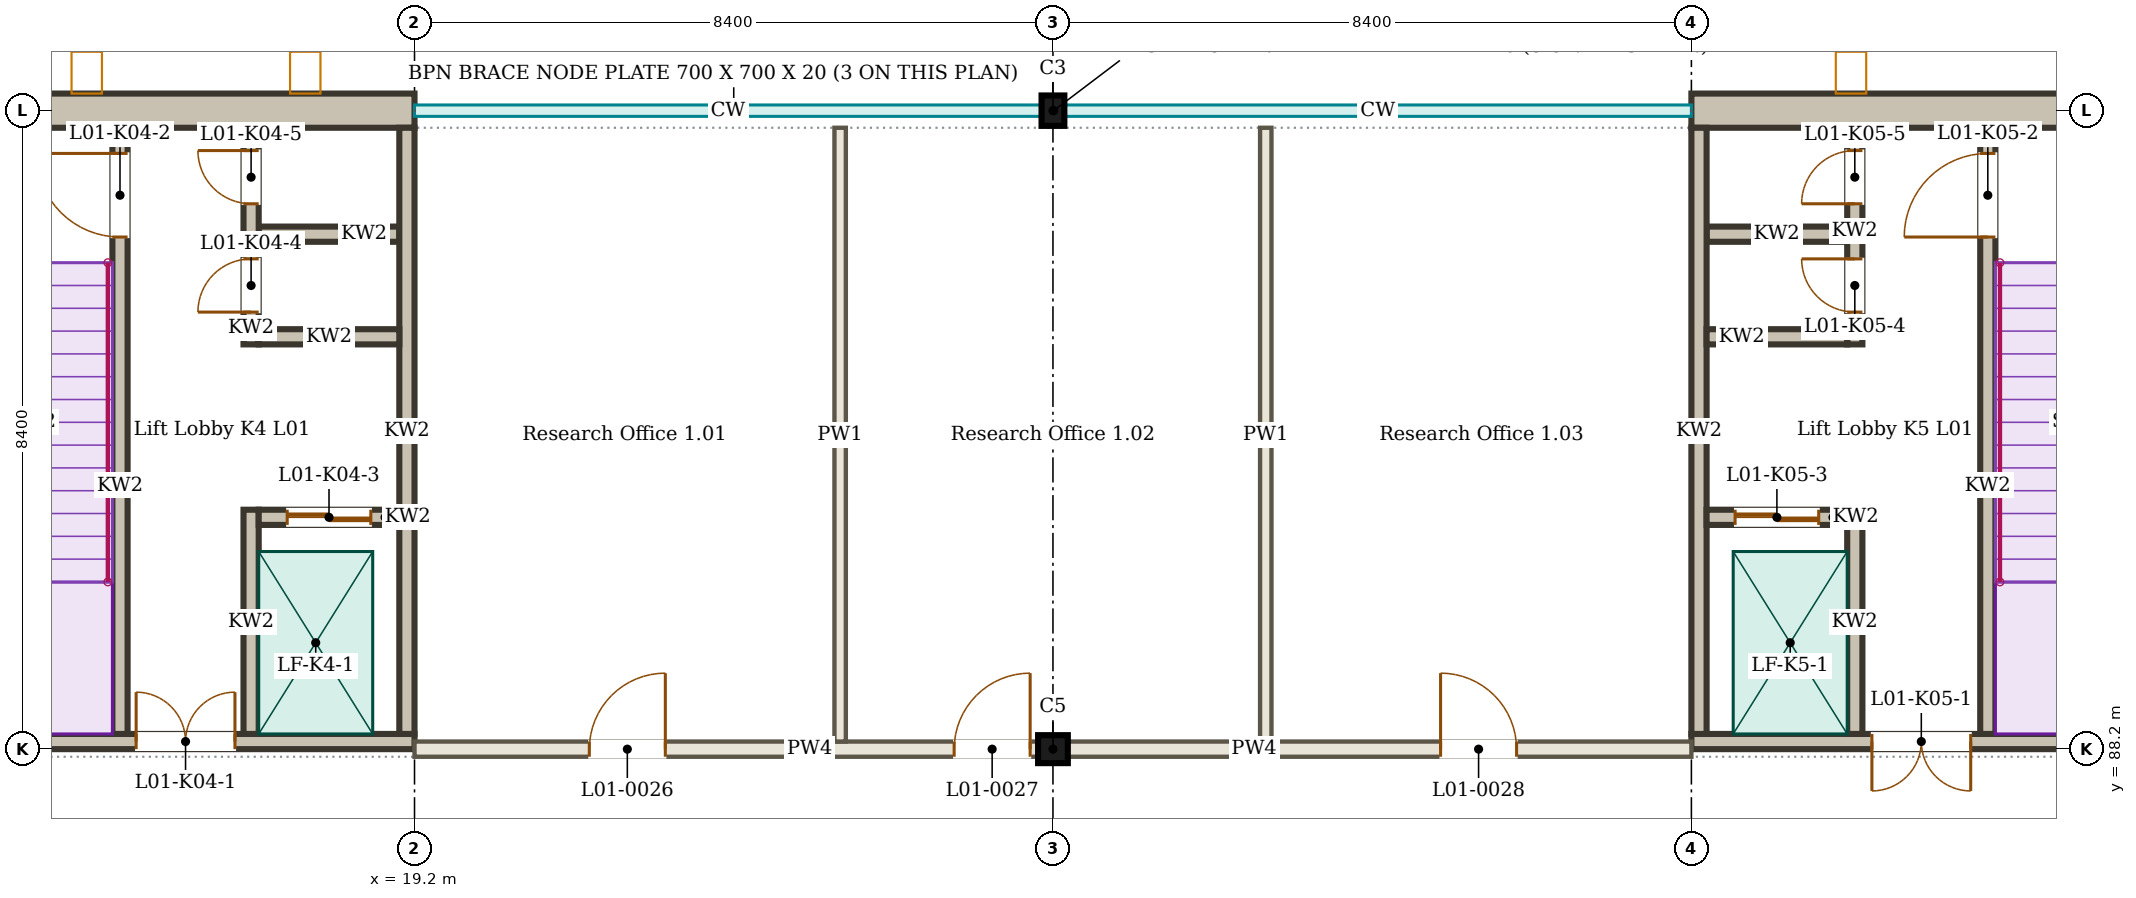
"""IFC4 building model, lengths in metres.
Left out: names, types, materials, properties, quantities, classifications, styles, units other than length and angle.
Written with IfcOpenShell. Run it as: python <this file> out.ifc"""

import sys

from ifc_helpers import new_model, si_unit, direction, frame, frame_2d, origin, origin_2d, place, context, subcontext, project, spatial, rectangle, i_section, extrude, element, fill, save


model = new_model("IFC4")
c1 = context("Model", 3, precision=1e-05, world=origin(), true_north=direction((0.0, 1.0)))
c2 = subcontext(c1, "Body", "Model", "MODEL_VIEW")
j1 = project(units=[si_unit("LENGTHUNIT", "METRE"), si_unit("PLANEANGLEUNIT", "RADIAN")], contexts=[c1])
p1 = place(None, origin())
s1 = spatial("IfcSite", under=j1, at=p1, CompositionType="ELEMENT")
p2 = place(p1, origin())
s2 = spatial("IfcBuilding", under=s1, at=p2, CompositionType="ELEMENT")
p3 = place(p2, frame((0.0, 0.0, 4.5)))
s3 = spatial("IfcBuildingStorey", under=s2, at=p3, CompositionType="ELEMENT", Elevation=4.5)
p4 = place(p3, frame((27.6, 88.2, 0.0), z_axis=(0.0, 0.0, 1.0), x_axis=(1.0, 0.0, 0.0)))
e1 = element("IfcColumn", 1, at=p4, inside=s3, PredefinedType="COLUMN", context=c2, shape_type="SweptSolid", body=[
    extrude(i_section(OverallWidth=0.391, OverallDepth=0.368, WebThickness=0.015, FlangeThickness=0.024, FilletRadius=0.027, at=origin_2d()), origin(), (0.0, 0.0, 1.0), 4.5),
])
p5 = place(p3, frame((27.6, 96.6, 0.0), z_axis=(0.0, 0.0, 1.0), x_axis=(1.0, 0.0, 0.0)))
e2 = element("IfcColumn", 2, at=p5, inside=s3, PredefinedType="COLUMN", context=c2, shape_type="SweptSolid", body=[
    extrude(i_section(OverallWidth=0.3, OverallDepth=0.4, WebThickness=0.013, FlangeThickness=0.024, FilletRadius=0.027, at=origin_2d()), origin(), (0.0, 0.0, 1.0), 4.5),
])
p6 = place(p3, frame((19.2, 88.2, 0.0), z_axis=(0.0, 0.0, 1.0), x_axis=(1.0, 0.0, 0.0)))
e3 = element("IfcWall", 3, at=p6, inside=s3, PredefinedType="PARTITIONING", context=c2, shape_type="SweptSolid", body=[
    extrude(rectangle(XDim=8.205, YDim=0.2, at=frame_2d((4.102, 0.0))), origin(), (0.0, 0.0, 1.0), 3.8),
])
p7 = place(p6, frame((2.3, 0.0, 0.0)))
e4 = element("IfcOpeningElement", 4, at=p7, cuts=e3, PredefinedType="OPENING", context=c2, shape_type="SweptSolid", body=[
    extrude(rectangle(XDim=1.0, YDim=2.1, at=frame_2d((0.5, 1.05))), frame((0.0, 0.11, 0.0), z_axis=(0.0, -1.0, 0.0), x_axis=(1.0, 0.0, 0.0)), (0.0, 0.0, 1.0), 0.22),
])
p8 = place(p6, frame((7.1, 0.0, 0.0)))
e5 = element("IfcOpeningElement", 5, at=p8, cuts=e3, PredefinedType="OPENING", context=c2, shape_type="SweptSolid", body=[
    extrude(rectangle(XDim=1.0, YDim=2.1, at=frame_2d((0.5, 1.05))), frame((0.0, 0.11, 0.0), z_axis=(0.0, -1.0, 0.0), x_axis=(1.0, 0.0, 0.0)), (0.0, 0.0, 1.0), 0.22),
])
p9 = place(p3, frame((27.795, 88.2, 0.0), z_axis=(0.0, 0.0, 1.0), x_axis=(1.0, 0.0, 0.0)))
e6 = element("IfcWall", 6, at=p9, inside=s3, PredefinedType="PARTITIONING", context=c2, shape_type="SweptSolid", body=[
    extrude(rectangle(XDim=8.205, YDim=0.2, at=frame_2d((4.102, 0.0))), origin(), (0.0, 0.0, 1.0), 3.8),
])
p10 = place(p9, frame((4.905, 0.0, 0.0)))
e7 = element("IfcOpeningElement", 7, at=p10, cuts=e6, PredefinedType="OPENING", context=c2, shape_type="SweptSolid", body=[
    extrude(rectangle(XDim=1.0, YDim=2.1, at=frame_2d((0.5, 1.05))), frame((0.0, 0.11, 0.0), z_axis=(0.0, -1.0, 0.0), x_axis=(1.0, 0.0, 0.0)), (0.0, 0.0, 1.0), 0.22),
])
for number, where, z_axis, x_axis in (
    (8, (24.8, 88.3, 0.0), (0.0, 0.0, 1.0), (0.0, 1.0, 0.0)),
    (9, (30.4, 88.3, 0.0), (0.0, 0.0, 1.0), (0.0, 1.0, 0.0)),
):
    element("IfcWall", number, at=place(p3, frame(where, z_axis=z_axis, x_axis=x_axis)), inside=s3, PredefinedType="PARTITIONING", context=c2, shape_type="SweptSolid", body=[
        extrude(rectangle(XDim=8.075, YDim=0.15, at=frame_2d((4.038, 0.0))), origin(), (0.0, 0.0, 1.0), 3.8),
    ])
p11 = place(p3, frame((11.025, 88.3, 0.0), z_axis=(0.0, 0.0, 1.0), x_axis=(1.0, 0.0, 0.0)))
e10 = element("IfcWall", 10, at=p11, inside=s3, PredefinedType="SOLIDWALL", context=c2, shape_type="SweptSolid", body=[
    extrude(rectangle(XDim=8.175, YDim=0.2, at=frame_2d((4.087, 0.0))), origin(), (0.0, 0.0, 1.0), 4.5),
])
p12 = place(p11, frame((4.512, 0.0, 0.0)))
e11 = element("IfcOpeningElement", 11, at=p12, cuts=e10, PredefinedType="OPENING", context=c2, shape_type="SweptSolid", body=[
    extrude(rectangle(XDim=1.3, YDim=2.1, at=frame_2d((0.65, 1.05))), frame((0.0, 0.11, 0.0), z_axis=(0.0, -1.0, 0.0), x_axis=(1.0, 0.0, 0.0)), (0.0, 0.0, 1.0), 0.22),
])
p13 = place(p3, frame((10.575, 96.6, 0.0), z_axis=(0.0, 0.0, 1.0), x_axis=(1.0, 0.0, 0.0)))
e12 = element("IfcWall", 12, at=p13, inside=s3, PredefinedType="SOLIDWALL", context=c2, shape_type="SweptSolid", body=[
    extrude(rectangle(XDim=8.625, YDim=0.45, at=frame_2d((4.312, 0.0))), origin(), (0.0, 0.0, 1.0), 4.5),
])
p14 = place(p3, frame((19.1, 88.4, 0.0), z_axis=(0.0, 0.0, 1.0), x_axis=(0.0, 1.0, 0.0)))
e13 = element("IfcWall", 13, at=p14, inside=s3, PredefinedType="SOLIDWALL", context=c2, shape_type="SweptSolid", body=[
    extrude(rectangle(XDim=7.975, YDim=0.2, at=frame_2d((3.988, 0.0))), origin(), (0.0, 0.0, 1.0), 4.5),
])
p15 = place(p3, frame((15.325, 88.4, 0.0), z_axis=(0.0, 0.0, 1.0), x_axis=(0.0, 1.0, 0.0)))
e14 = element("IfcWall", 14, at=p15, inside=s3, PredefinedType="SOLIDWALL", context=c2, shape_type="SweptSolid", body=[
    extrude(rectangle(XDim=7.975, YDim=0.2, at=frame_2d((3.988, 0.0))), origin(), (0.0, 0.0, 1.0), 4.5),
])
p16 = place(p15, frame((6.538, 0.0, 0.0)))
e15 = element("IfcOpeningElement", 15, at=p16, cuts=e14, PredefinedType="OPENING", context=c2, shape_type="SweptSolid", body=[
    extrude(rectangle(XDim=1.1, YDim=2.1, at=frame_2d((0.55, 1.05))), frame((0.0, 0.11, 0.0), z_axis=(0.0, -1.0, 0.0), x_axis=(1.0, 0.0, 0.0)), (0.0, 0.0, 1.0), 0.22),
])
p17 = place(p3, frame((17.05, 88.4, 0.0), z_axis=(0.0, 0.0, 1.0), x_axis=(0.0, 1.0, 0.0)))
e16 = element("IfcWall", 16, at=p17, inside=s3, PredefinedType="SOLIDWALL", context=c2, shape_type="SweptSolid", body=[
    extrude(rectangle(XDim=2.95, YDim=0.2, at=frame_2d((1.475, 0.0))), origin(), (0.0, 0.0, 1.0), 4.5),
])
p18 = place(p3, frame((17.05, 93.525, 0.0), z_axis=(0.0, 0.0, 1.0), x_axis=(0.0, 1.0, 0.0)))
e17 = element("IfcWall", 17, at=p18, inside=s3, PredefinedType="SOLIDWALL", context=c2, shape_type="SweptSolid", body=[
    extrude(rectangle(XDim=2.85, YDim=0.2, at=frame_2d((1.425, 0.0))), origin(), (0.0, 0.0, 1.0), 4.35),
])
p19 = place(p18, frame((0.425, 0.0, 0.0)))
e18 = element("IfcOpeningElement", 18, at=p19, cuts=e17, PredefinedType="OPENING", context=c2, shape_type="SweptSolid", body=[
    extrude(rectangle(XDim=0.7, YDim=2.1, at=frame_2d((0.35, 1.05))), frame((0.0, 0.11, 0.0), z_axis=(0.0, -1.0, 0.0), x_axis=(1.0, 0.0, 0.0)), (0.0, 0.0, 1.0), 0.22),
])
p20 = place(p18, frame((1.85, 0.0, 0.0)))
e19 = element("IfcOpeningElement", 19, at=p20, cuts=e17, PredefinedType="OPENING", context=c2, shape_type="SweptSolid", body=[
    extrude(rectangle(XDim=0.7, YDim=2.1, at=frame_2d((0.35, 1.05))), frame((0.0, 0.11, 0.0), z_axis=(0.0, -1.0, 0.0), x_axis=(1.0, 0.0, 0.0)), (0.0, 0.0, 1.0), 0.22),
])
p21 = place(p3, frame((17.15, 91.25, 0.0), z_axis=(0.0, 0.0, 1.0), x_axis=(1.0, 0.0, 0.0)))
e20 = element("IfcWall", 20, at=p21, inside=s3, PredefinedType="SOLIDWALL", context=c2, shape_type="SweptSolid", body=[
    extrude(rectangle(XDim=1.85, YDim=0.2, at=frame_2d((0.925, 0.0))), origin(), (0.0, 0.0, 1.0), 4.5),
])
p22 = place(p21, frame((0.375, 0.0, 0.0)))
e21 = element("IfcOpeningElement", 21, at=p22, cuts=e20, PredefinedType="OPENING", context=c2, shape_type="SweptSolid", body=[
    extrude(rectangle(XDim=1.1, YDim=2.1, at=frame_2d((0.55, 1.05))), frame((0.0, 0.11, 0.0), z_axis=(0.0, -1.0, 0.0), x_axis=(1.0, 0.0, 0.0)), (0.0, 0.0, 1.0), 0.22),
])
for number, where, z_axis, x_axis in (
    (22, (17.15, 93.625, 0.0), (0.0, 0.0, 1.0), (1.0, 0.0, 0.0)),
    (23, (17.15, 94.975, 0.0), (0.0, 0.0, 1.0), (1.0, 0.0, 0.0)),
):
    element("IfcWall", number, at=place(p3, frame(where, z_axis=z_axis, x_axis=x_axis)), inside=s3, PredefinedType="SOLIDWALL", context=c2, shape_type="SweptSolid", body=[
        extrude(rectangle(XDim=1.85, YDim=0.2, at=frame_2d((0.925, 0.0))), origin(), (0.0, 0.0, 1.0), 4.35),
    ])
p23 = place(p3, frame((44.4, 88.3, 0.0), z_axis=(0.0, 0.0, 1.0), x_axis=(-1.0, 0.0, 0.0)))
e24 = element("IfcWall", 24, at=p23, inside=s3, PredefinedType="SOLIDWALL", context=c2, shape_type="SweptSolid", body=[
    extrude(rectangle(XDim=8.4, YDim=0.2, at=frame_2d((4.2, 0.0))), origin(), (0.0, 0.0, 1.0), 4.5),
])
p24 = place(p23, frame((4.725, 0.0, 0.0)))
e25 = element("IfcOpeningElement", 25, at=p24, cuts=e24, PredefinedType="OPENING", context=c2, shape_type="SweptSolid", body=[
    extrude(rectangle(XDim=1.3, YDim=2.1, at=frame_2d((0.65, 1.05))), frame((0.0, 0.11, 0.0), z_axis=(0.0, -1.0, 0.0), x_axis=(1.0, 0.0, 0.0)), (0.0, 0.0, 1.0), 0.22),
])
p25 = place(p3, frame((44.4, 96.6, 0.0), z_axis=(0.0, 0.0, 1.0), x_axis=(-1.0, 0.0, 0.0)))
e26 = element("IfcWall", 26, at=p25, inside=s3, PredefinedType="SOLIDWALL", context=c2, shape_type="SweptSolid", body=[
    extrude(rectangle(XDim=8.4, YDim=0.45, at=frame_2d((4.2, 0.0))), origin(), (0.0, 0.0, 1.0), 4.5),
])
p26 = place(p3, frame((36.1, 88.4, 0.0), z_axis=(0.0, 0.0, 1.0), x_axis=(0.0, 1.0, 0.0)))
e27 = element("IfcWall", 27, at=p26, inside=s3, PredefinedType="SOLIDWALL", context=c2, shape_type="SweptSolid", body=[
    extrude(rectangle(XDim=7.975, YDim=0.2, at=frame_2d((3.988, 0.0))), origin(), (0.0, 0.0, 1.0), 4.5),
])
p27 = place(p3, frame((39.9, 88.4, 0.0), z_axis=(0.0, 0.0, 1.0), x_axis=(0.0, 1.0, 0.0)))
e28 = element("IfcWall", 28, at=p27, inside=s3, PredefinedType="SOLIDWALL", context=c2, shape_type="SweptSolid", body=[
    extrude(rectangle(XDim=7.975, YDim=0.2, at=frame_2d((3.988, 0.0))), origin(), (0.0, 0.0, 1.0), 4.5),
])
p28 = place(p27, frame((6.538, 0.0, 0.0)))
e29 = element("IfcOpeningElement", 29, at=p28, cuts=e28, PredefinedType="OPENING", context=c2, shape_type="SweptSolid", body=[
    extrude(rectangle(XDim=1.1, YDim=2.1, at=frame_2d((0.55, 1.05))), frame((0.0, 0.11, 0.0), z_axis=(0.0, -1.0, 0.0), x_axis=(1.0, 0.0, 0.0)), (0.0, 0.0, 1.0), 0.22),
])
p29 = place(p3, frame((38.15, 88.4, 0.0), z_axis=(0.0, 0.0, 1.0), x_axis=(0.0, 1.0, 0.0)))
e30 = element("IfcWall", 30, at=p29, inside=s3, PredefinedType="SOLIDWALL", context=c2, shape_type="SweptSolid", body=[
    extrude(rectangle(XDim=2.95, YDim=0.2, at=frame_2d((1.475, 0.0))), origin(), (0.0, 0.0, 1.0), 4.5),
])
p30 = place(p3, frame((38.15, 93.525, 0.0), z_axis=(0.0, 0.0, 1.0), x_axis=(0.0, 1.0, 0.0)))
e31 = element("IfcWall", 31, at=p30, inside=s3, PredefinedType="SOLIDWALL", context=c2, shape_type="SweptSolid", body=[
    extrude(rectangle(XDim=2.85, YDim=0.2, at=frame_2d((1.425, 0.0))), origin(), (0.0, 0.0, 1.0), 4.35),
])
p31 = place(p30, frame((0.425, 0.0, 0.0)))
e32 = element("IfcOpeningElement", 32, at=p31, cuts=e31, PredefinedType="OPENING", context=c2, shape_type="SweptSolid", body=[
    extrude(rectangle(XDim=0.7, YDim=2.1, at=frame_2d((0.35, 1.05))), frame((0.0, 0.11, 0.0), z_axis=(0.0, -1.0, 0.0), x_axis=(1.0, 0.0, 0.0)), (0.0, 0.0, 1.0), 0.22),
])
p32 = place(p30, frame((1.85, 0.0, 0.0)))
e33 = element("IfcOpeningElement", 33, at=p32, cuts=e31, PredefinedType="OPENING", context=c2, shape_type="SweptSolid", body=[
    extrude(rectangle(XDim=0.7, YDim=2.1, at=frame_2d((0.35, 1.05))), frame((0.0, 0.11, 0.0), z_axis=(0.0, -1.0, 0.0), x_axis=(1.0, 0.0, 0.0)), (0.0, 0.0, 1.0), 0.22),
])
p33 = place(p3, frame((38.05, 91.25, 0.0), z_axis=(0.0, 0.0, 1.0), x_axis=(-1.0, 0.0, 0.0)))
e34 = element("IfcWall", 34, at=p33, inside=s3, PredefinedType="SOLIDWALL", context=c2, shape_type="SweptSolid", body=[
    extrude(rectangle(XDim=1.85, YDim=0.2, at=frame_2d((0.925, 0.0))), origin(), (0.0, 0.0, 1.0), 4.5),
])
p34 = place(p33, frame((0.375, 0.0, 0.0)))
e35 = element("IfcOpeningElement", 35, at=p34, cuts=e34, PredefinedType="OPENING", context=c2, shape_type="SweptSolid", body=[
    extrude(rectangle(XDim=1.1, YDim=2.1, at=frame_2d((0.55, 1.05))), frame((0.0, 0.11, 0.0), z_axis=(0.0, -1.0, 0.0), x_axis=(1.0, 0.0, 0.0)), (0.0, 0.0, 1.0), 0.22),
])
for number, where, z_axis, x_axis in (
    (36, (38.05, 93.625, 0.0), (0.0, 0.0, 1.0), (-1.0, 0.0, 0.0)),
    (37, (38.05, 94.975, 0.0), (0.0, 0.0, 1.0), (-1.0, 0.0, 0.0)),
):
    element("IfcWall", number, at=place(p3, frame(where, z_axis=z_axis, x_axis=x_axis)), inside=s3, PredefinedType="SOLIDWALL", context=c2, shape_type="SweptSolid", body=[
        extrude(rectangle(XDim=1.85, YDim=0.2, at=frame_2d((0.925, 0.0))), origin(), (0.0, 0.0, 1.0), 4.35),
    ])
p35 = place(p7, origin())
e38 = element("IfcDoor", 38, at=p35, inside=s3, OperationType="SINGLE_SWING_RIGHT", PredefinedType="DOOR", context=c2, shape_type="SweptSolid", body=[
    extrude(rectangle(XDim=1.0, YDim=2.1, at=frame_2d((0.5, 1.05))), frame((0.0, 0.025, 0.0), z_axis=(0.0, -1.0, 0.0), x_axis=(1.0, 0.0, 0.0)), (0.0, 0.0, 1.0), 0.05),
])
fill(e4, e38)
p36 = place(p8, origin())
e39 = element("IfcDoor", 39, at=p36, inside=s3, OperationType="SINGLE_SWING_RIGHT", PredefinedType="DOOR", context=c2, shape_type="SweptSolid", body=[
    extrude(rectangle(XDim=1.0, YDim=2.1, at=frame_2d((0.5, 1.05))), frame((0.0, 0.025, 0.0), z_axis=(0.0, -1.0, 0.0), x_axis=(1.0, 0.0, 0.0)), (0.0, 0.0, 1.0), 0.05),
])
fill(e5, e39)
p37 = place(p10, origin())
e40 = element("IfcDoor", 40, at=p37, inside=s3, OperationType="SINGLE_SWING_LEFT", PredefinedType="DOOR", context=c2, shape_type="SweptSolid", body=[
    extrude(rectangle(XDim=1.0, YDim=2.1, at=frame_2d((0.5, 1.05))), frame((0.0, 0.025, 0.0), z_axis=(0.0, -1.0, 0.0), x_axis=(1.0, 0.0, 0.0)), (0.0, 0.0, 1.0), 0.05),
])
fill(e7, e40)
p38 = place(p12, origin())
e41 = element("IfcDoor", 41, at=p38, inside=s3, OperationType="DOUBLE_DOOR_DOUBLE_SWING", PredefinedType="DOOR", context=c2, shape_type="SweptSolid", body=[
    extrude(rectangle(XDim=1.3, YDim=2.1, at=frame_2d((0.65, 1.05))), frame((0.0, 0.025, 0.0), z_axis=(0.0, -1.0, 0.0), x_axis=(1.0, 0.0, 0.0)), (0.0, 0.0, 1.0), 0.05),
])
fill(e11, e41)
p39 = place(p16, origin())
e42 = element("IfcDoor", 42, at=p39, inside=s3, OperationType="SINGLE_SWING_RIGHT", PredefinedType="DOOR", context=c2, shape_type="SweptSolid", body=[
    extrude(rectangle(XDim=1.1, YDim=2.1, at=frame_2d((0.55, 1.05))), frame((0.0, 0.025, 0.0), z_axis=(0.0, -1.0, 0.0), x_axis=(1.0, 0.0, 0.0)), (0.0, 0.0, 1.0), 0.05),
])
fill(e15, e42)
p40 = place(p22, origin())
e43 = element("IfcDoor", 43, at=p40, inside=s3, OperationType="DOUBLE_DOOR_SLIDING", PredefinedType="DOOR", context=c2, shape_type="SweptSolid", body=[
    extrude(rectangle(XDim=1.1, YDim=2.1, at=frame_2d((0.55, 1.05))), frame((0.0, 0.025, 0.0), z_axis=(0.0, -1.0, 0.0), x_axis=(1.0, 0.0, 0.0)), (0.0, 0.0, 1.0), 0.05),
])
fill(e21, e43)
p41 = place(p19, origin())
e44 = element("IfcDoor", 44, at=p41, inside=s3, OperationType="SINGLE_SWING_LEFT", PredefinedType="DOOR", context=c2, shape_type="SweptSolid", body=[
    extrude(rectangle(XDim=0.7, YDim=2.1, at=frame_2d((0.35, 1.05))), frame((0.0, 0.025, 0.0), z_axis=(0.0, -1.0, 0.0), x_axis=(1.0, 0.0, 0.0)), (0.0, 0.0, 1.0), 0.05),
])
fill(e18, e44)
p42 = place(p20, origin())
e45 = element("IfcDoor", 45, at=p42, inside=s3, OperationType="SINGLE_SWING_RIGHT", PredefinedType="DOOR", context=c2, shape_type="SweptSolid", body=[
    extrude(rectangle(XDim=0.7, YDim=2.1, at=frame_2d((0.35, 1.05))), frame((0.0, 0.025, 0.0), z_axis=(0.0, -1.0, 0.0), x_axis=(1.0, 0.0, 0.0)), (0.0, 0.0, 1.0), 0.05),
])
fill(e19, e45)
p43 = place(p24, origin())
e46 = element("IfcDoor", 46, at=p43, inside=s3, OperationType="DOUBLE_DOOR_DOUBLE_SWING", PredefinedType="DOOR", context=c2, shape_type="SweptSolid", body=[
    extrude(rectangle(XDim=1.3, YDim=2.1, at=frame_2d((0.65, 1.05))), frame((0.0, 0.025, 0.0), z_axis=(0.0, -1.0, 0.0), x_axis=(1.0, 0.0, 0.0)), (0.0, 0.0, 1.0), 0.05),
])
fill(e25, e46)
p44 = place(p28, origin())
e47 = element("IfcDoor", 47, at=p44, inside=s3, OperationType="SINGLE_SWING_LEFT", PredefinedType="DOOR", context=c2, shape_type="SweptSolid", body=[
    extrude(rectangle(XDim=1.1, YDim=2.1, at=frame_2d((0.55, 1.05))), frame((0.0, 0.025, 0.0), z_axis=(0.0, -1.0, 0.0), x_axis=(1.0, 0.0, 0.0)), (0.0, 0.0, 1.0), 0.05),
])
fill(e29, e47)
p45 = place(p34, origin())
e48 = element("IfcDoor", 48, at=p45, inside=s3, OperationType="DOUBLE_DOOR_SLIDING", PredefinedType="DOOR", context=c2, shape_type="SweptSolid", body=[
    extrude(rectangle(XDim=1.1, YDim=2.1, at=frame_2d((0.55, 1.05))), frame((0.0, 0.025, 0.0), z_axis=(0.0, -1.0, 0.0), x_axis=(1.0, 0.0, 0.0)), (0.0, 0.0, 1.0), 0.05),
])
fill(e35, e48)
p46 = place(p31, origin())
e49 = element("IfcDoor", 49, at=p46, inside=s3, OperationType="SINGLE_SWING_RIGHT", PredefinedType="DOOR", context=c2, shape_type="SweptSolid", body=[
    extrude(rectangle(XDim=0.7, YDim=2.1, at=frame_2d((0.35, 1.05))), frame((0.0, 0.025, 0.0), z_axis=(0.0, -1.0, 0.0), x_axis=(1.0, 0.0, 0.0)), (0.0, 0.0, 1.0), 0.05),
])
fill(e32, e49)
p47 = place(p32, origin())
e50 = element("IfcDoor", 50, at=p47, inside=s3, OperationType="SINGLE_SWING_LEFT", PredefinedType="DOOR", context=c2, shape_type="SweptSolid", body=[
    extrude(rectangle(XDim=0.7, YDim=2.1, at=frame_2d((0.35, 1.05))), frame((0.0, 0.025, 0.0), z_axis=(0.0, -1.0, 0.0), x_axis=(1.0, 0.0, 0.0)), (0.0, 0.0, 1.0), 0.05),
])
fill(e33, e50)
save(model, sys.argv[1])
